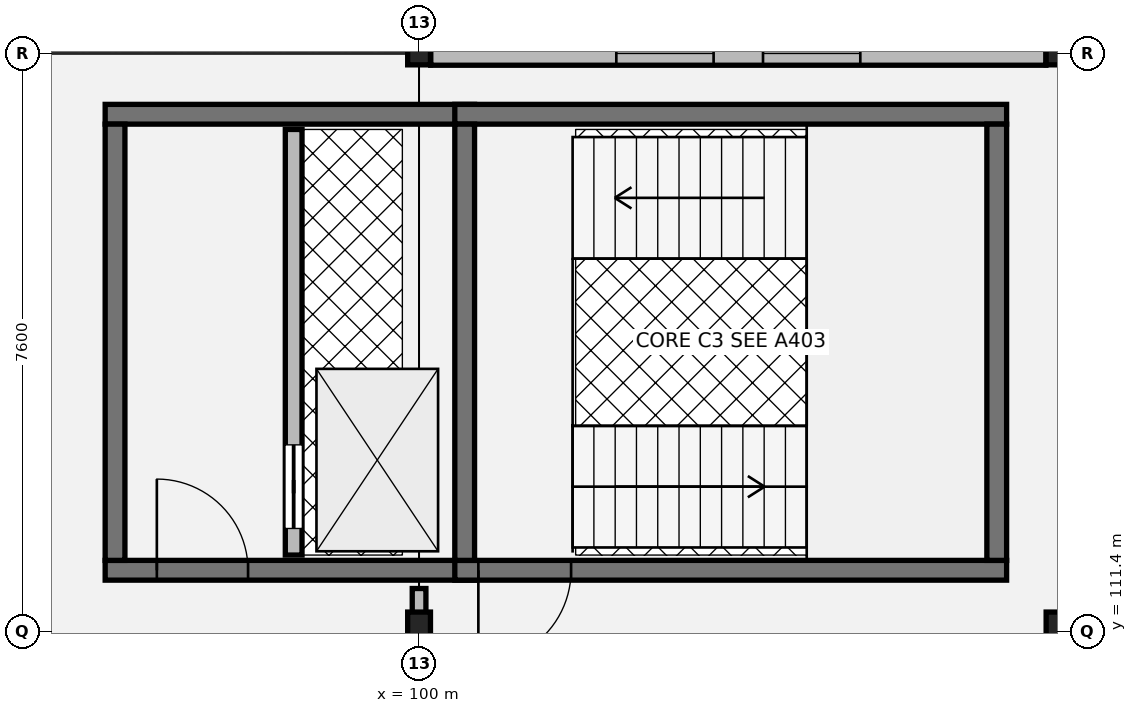
"""IFC4 building model, lengths in metres.
Left out: names, types, materials, properties, quantities, classifications, styles, units other than length and angle.
Written with IfcOpenShell. Run it as: python <this file> out.ifc"""

import sys

from ifc_helpers import new_model, si_unit, direction, frame, frame_2d, origin, origin_2d, place, context, subcontext, project, spatial, rectangle, hollow_rectangle, i_section, extrude, element, fill, save


model = new_model("IFC4")
c1 = context("Model", 3, precision=1e-05, world=origin(), true_north=direction((0.0, 1.0)))
c2 = subcontext(c1, "Body", "Model", "MODEL_VIEW")
j1 = project(units=[si_unit("LENGTHUNIT", "METRE"), si_unit("PLANEANGLEUNIT", "RADIAN")], contexts=[c1])
p1 = place(None, origin())
s1 = spatial("IfcSite", under=j1, at=p1, CompositionType="ELEMENT")
p2 = place(p1, origin())
s2 = spatial("IfcBuilding", under=s1, at=p2, CompositionType="ELEMENT")
p3 = place(p2, frame((0.0, 0.0, 5.1)))
s3 = spatial("IfcBuildingStorey", under=s2, at=p3, CompositionType="ELEMENT", Elevation=5.1)
p4 = place(p3, frame((100.0, 111.4, 0.0), z_axis=(0.0, 0.0, 1.0), x_axis=(1.0, 0.0, 0.0)))
e1 = element("IfcColumn", 1, at=p4, inside=s3, PredefinedType="COLUMN", context=c2, shape_type="SweptSolid", body=[
    extrude(i_section(OverallWidth=0.3, OverallDepth=0.5, WebThickness=0.014, FlangeThickness=0.028, at=origin_2d()), origin(), (0.0, 0.0, 1.0), 4.055),
])
p5 = place(p3, frame((100.0, 119.0, 0.0), z_axis=(0.0, 0.0, 1.0), x_axis=(1.0, 0.0, 0.0)))
e2 = element("IfcColumn", 2, at=p5, inside=s3, PredefinedType="COLUMN", context=c2, shape_type="SweptSolid", body=[
    extrude(hollow_rectangle(XDim=0.3, YDim=0.3, WallThickness=0.012, at=origin_2d()), origin(), (0.0, 0.0, 1.0), 4.055),
])
p6 = place(p3, frame((108.4, 111.4, 0.0), z_axis=(0.0, 0.0, 1.0), x_axis=(1.0, 0.0, 0.0)))
e3 = element("IfcColumn", 3, at=p6, inside=s3, PredefinedType="COLUMN", context=c2, shape_type="SweptSolid", body=[
    extrude(i_section(OverallWidth=0.3, OverallDepth=0.5, WebThickness=0.014, FlangeThickness=0.028, at=origin_2d()), origin(), (0.0, 0.0, 1.0), 4.055),
])
p7 = place(p3, frame((108.4, 119.0, 0.0), z_axis=(0.0, 0.0, 1.0), x_axis=(1.0, 0.0, 0.0)))
e4 = element("IfcColumn", 4, at=p7, inside=s3, PredefinedType="COLUMN", context=c2, shape_type="SweptSolid", body=[
    extrude(hollow_rectangle(XDim=0.3, YDim=0.3, WallThickness=0.012, at=origin_2d()), origin(), (0.0, 0.0, 1.0), 4.055),
])
p8 = place(p3, frame((108.247, 119.0, 0.0), z_axis=(0.0, 0.0, 1.0), x_axis=(-1.0, 0.0, 0.0)))
e5 = element("IfcWall", 5, at=p8, inside=s3, PredefinedType="SOLIDWALL", context=c2, shape_type="SweptSolid", body=[
    extrude(rectangle(XDim=8.094, YDim=0.31, at=frame_2d((4.047, 0.0))), origin(), (0.0, 0.0, 1.0), 3.48),
])
p9 = place(p8, frame((2.442, 0.0, 0.8)))
e6 = element("IfcOpeningElement", 6, at=p9, cuts=e5, PredefinedType="OPENING", context=c2, shape_type="SweptSolid", body=[
    extrude(rectangle(XDim=1.28, YDim=2.08, at=frame_2d((0.64, 1.04))), frame((0.0, 0.165, 0.0), z_axis=(0.0, -1.0, 0.0), x_axis=(1.0, 0.0, 0.0)), (0.0, 0.0, 1.0), 0.33),
])
p10 = place(p8, frame((4.372, 0.0, 0.8)))
e7 = element("IfcOpeningElement", 7, at=p10, cuts=e5, PredefinedType="OPENING", context=c2, shape_type="SweptSolid", body=[
    extrude(rectangle(XDim=1.28, YDim=2.08, at=frame_2d((0.64, 1.04))), frame((0.0, 0.165, 0.0), z_axis=(0.0, -1.0, 0.0), x_axis=(1.0, 0.0, 0.0)), (0.0, 0.0, 1.0), 0.33),
])
p11 = place(p3, frame((95.87, 112.2, 0.0), z_axis=(0.0, 0.0, 1.0), x_axis=(1.0, 0.0, 0.0)))
e8 = element("IfcWall", 8, at=p11, inside=s3, PredefinedType="SHEAR", context=c2, shape_type="SweptSolid", body=[
    extrude(rectangle(XDim=4.86, YDim=0.26, at=frame_2d((2.43, 0.0))), origin(), (0.0, 0.0, 1.0), 3.845),
])
p12 = place(p11, frame((0.68, 0.0, 0.0)))
e9 = element("IfcOpeningElement", 9, at=p12, cuts=e8, PredefinedType="OPENING", context=c2, shape_type="SweptSolid", body=[
    extrude(rectangle(XDim=1.2, YDim=2.16, at=frame_2d((0.6, 1.08))), frame((0.0, 0.14, 0.0), z_axis=(0.0, -1.0, 0.0), x_axis=(1.0, 0.0, 0.0)), (0.0, 0.0, 1.0), 0.28),
])
p13 = place(p3, frame((100.73, 118.2, 0.0), z_axis=(0.0, 0.0, 1.0), x_axis=(-1.0, 0.0, 0.0)))
e10 = element("IfcWall", 10, at=p13, inside=s3, PredefinedType="SHEAR", context=c2, shape_type="SweptSolid", body=[
    extrude(rectangle(XDim=4.86, YDim=0.26, at=frame_2d((2.43, 0.0))), origin(), (0.0, 0.0, 1.0), 3.845),
])
p14 = place(p3, frame((96.0, 118.07, 0.0), z_axis=(0.0, 0.0, 1.0), x_axis=(0.0, -1.0, 0.0)))
e11 = element("IfcWall", 11, at=p14, inside=s3, PredefinedType="SHEAR", context=c2, shape_type="SweptSolid", body=[
    extrude(rectangle(XDim=5.74, YDim=0.26, at=frame_2d((2.87, 0.0))), origin(), (0.0, 0.0, 1.0), 3.845),
])
p15 = place(p3, frame((98.35, 112.4, 0.0), z_axis=(0.0, 0.0, 1.0), x_axis=(0.0, 1.0, 0.0)))
e12 = element("IfcWall", 12, at=p15, inside=s3, PredefinedType="SOLIDWALL", context=c2, shape_type="SweptSolid", body=[
    extrude(rectangle(XDim=5.6, YDim=0.22, at=frame_2d((2.8, 0.0))), origin(), (0.0, 0.0, 1.0), 3.845),
])
p16 = place(p15, frame((0.35, 0.0, 0.0)))
e13 = element("IfcOpeningElement", 13, at=p16, cuts=e12, PredefinedType="OPENING", context=c2, shape_type="SweptSolid", body=[
    extrude(rectangle(XDim=1.1, YDim=2.15, at=frame_2d((0.55, 1.075))), frame((0.0, 0.12, 0.0), z_axis=(0.0, -1.0, 0.0), x_axis=(1.0, 0.0, 0.0)), (0.0, 0.0, 1.0), 0.24),
])
p17 = place(p3, frame((100.47, 112.2, 0.0), z_axis=(0.0, 0.0, 1.0), x_axis=(1.0, 0.0, 0.0)))
e14 = element("IfcWall", 14, at=p17, inside=s3, PredefinedType="SHEAR", context=c2, shape_type="SweptSolid", body=[
    extrude(rectangle(XDim=7.26, YDim=0.26, at=frame_2d((3.63, 0.0))), origin(), (0.0, 0.0, 1.0), 3.845),
])
p18 = place(p17, frame((0.31, 0.0, 0.0)))
e15 = element("IfcOpeningElement", 15, at=p18, cuts=e14, PredefinedType="OPENING", context=c2, shape_type="SweptSolid", body=[
    extrude(rectangle(XDim=1.22, YDim=2.18, at=frame_2d((0.61, 1.09))), frame((0.0, 0.14, 0.0), z_axis=(0.0, -1.0, 0.0), x_axis=(1.0, 0.0, 0.0)), (0.0, 0.0, 1.0), 0.28),
])
p19 = place(p3, frame((100.47, 118.2, 0.0), z_axis=(0.0, 0.0, 1.0), x_axis=(1.0, 0.0, 0.0)))
e16 = element("IfcWall", 16, at=p19, inside=s3, PredefinedType="SHEAR", context=c2, shape_type="SweptSolid", body=[
    extrude(rectangle(XDim=7.26, YDim=0.26, at=frame_2d((3.63, 0.0))), origin(), (0.0, 0.0, 1.0), 3.845),
])
for number, where, z_axis, x_axis in (
    (17, (100.6, 112.33, 0.0), (0.0, 0.0, 1.0), (0.0, 1.0, 0.0)),
    (18, (107.6, 112.33, 0.0), (0.0, 0.0, 1.0), (0.0, 1.0, 0.0)),
):
    element("IfcWall", number, at=place(p3, frame(where, z_axis=z_axis, x_axis=x_axis)), inside=s3, PredefinedType="SHEAR", context=c2, shape_type="SweptSolid", body=[
        extrude(rectangle(XDim=5.74, YDim=0.26, at=frame_2d((2.87, 0.0))), origin(), (0.0, 0.0, 1.0), 3.845),
    ])
p20 = place(p3, frame((100.0, 111.64, 0.0), z_axis=(0.0, 0.0, 1.0), x_axis=(0.0, 1.0, 0.0)))
e19 = element("IfcWall", 19, at=p20, inside=s3, PredefinedType="PARTITIONING", context=c2, shape_type="SweptSolid", body=[
    extrude(rectangle(XDim=0.32, YDim=0.18, at=frame_2d((0.16, 0.0))), origin(), (0.0, 0.0, 1.0), 3.18),
])
p21 = place(p9, origin())
e20 = element("IfcWindow", 20, at=p21, inside=s3, PartitioningType="SINGLE_PANEL", PredefinedType="WINDOW", context=c2, shape_type="SweptSolid", body=[
    extrude(rectangle(XDim=1.28, YDim=2.08, at=frame_2d((0.64, 1.04))), frame((0.0, 0.03, 0.0), z_axis=(0.0, -1.0, 0.0), x_axis=(1.0, 0.0, 0.0)), (0.0, 0.0, 1.0), 0.06),
])
fill(e6, e20)
p22 = place(p10, origin())
e21 = element("IfcWindow", 21, at=p22, inside=s3, PartitioningType="SINGLE_PANEL", PredefinedType="WINDOW", context=c2, shape_type="SweptSolid", body=[
    extrude(rectangle(XDim=1.28, YDim=2.08, at=frame_2d((0.64, 1.04))), frame((0.0, 0.03, 0.0), z_axis=(0.0, -1.0, 0.0), x_axis=(1.0, 0.0, 0.0)), (0.0, 0.0, 1.0), 0.06),
])
fill(e7, e21)
p23 = place(p12, origin())
e22 = element("IfcDoor", 22, at=p23, inside=s3, OperationType="SINGLE_SWING_LEFT", PredefinedType="DOOR", context=c2, shape_type="SweptSolid", body=[
    extrude(rectangle(XDim=1.2, YDim=2.16, at=frame_2d((0.6, 1.08))), frame((0.0, 0.025, 0.0), z_axis=(0.0, -1.0, 0.0), x_axis=(1.0, 0.0, 0.0)), (0.0, 0.0, 1.0), 0.05),
])
fill(e9, e22)
p24 = place(p16, origin())
e23 = element("IfcDoor", 23, at=p24, inside=s3, OperationType="SLIDING_TO_LEFT", PredefinedType="DOOR", context=c2, shape_type="SweptSolid", body=[
    extrude(rectangle(XDim=1.1, YDim=2.15, at=frame_2d((0.55, 1.075))), frame((0.0, 0.025, 0.0), z_axis=(0.0, -1.0, 0.0), x_axis=(1.0, 0.0, 0.0)), (0.0, 0.0, 1.0), 0.05),
])
fill(e13, e23)
p25 = place(p18, origin())
e24 = element("IfcDoor", 24, at=p25, inside=s3, OperationType="SINGLE_SWING_RIGHT", PredefinedType="DOOR", context=c2, shape_type="SweptSolid", body=[
    extrude(rectangle(XDim=1.22, YDim=2.18, at=frame_2d((0.61, 1.09))), frame((0.0, 0.025, 0.0), z_axis=(0.0, -1.0, 0.0), x_axis=(1.0, 0.0, 0.0)), (0.0, 0.0, 1.0), 0.05),
])
fill(e15, e24)
save(model, sys.argv[1])
